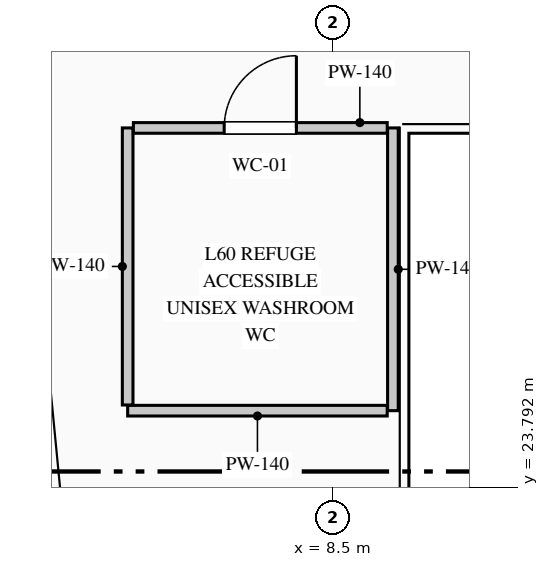
"""IFC4 building model, lengths in metres.
Left out: names, types, materials, properties, quantities, classifications, styles, units other than length and angle.
Written with IfcOpenShell. Run it as: python <this file> out.ifc"""

import sys

from ifc_helpers import new_model, si_unit, direction, frame, frame_2d, origin, place, context, subcontext, project, spatial, rectangle, extrude, element, fill, save


model = new_model("IFC4")
c1 = context("Model", 3, precision=1e-05, world=origin(), true_north=direction((0.0, 1.0)))
c2 = subcontext(c1, "Body", "Model", "MODEL_VIEW")
j1 = project(units=[si_unit("LENGTHUNIT", "METRE"), si_unit("PLANEANGLEUNIT", "RADIAN")], contexts=[c1])
p1 = place(None, origin())
s1 = spatial("IfcSite", under=j1, at=p1, CompositionType="ELEMENT")
p2 = place(p1, origin())
s2 = spatial("IfcBuilding", under=s1, at=p2, CompositionType="ELEMENT")
p3 = place(p2, frame((0.0, 0.0, 250.9)))
s3 = spatial("IfcBuildingStorey", under=s2, at=p3, CompositionType="ELEMENT", Elevation=250.9)
p4 = place(p3, frame((9.29, 28.52, 0.0), z_axis=(0.0, 0.0, 1.0), x_axis=(0.0, -1.0, 0.0)))
e1 = element("IfcWall", 1, at=p4, inside=s3, PredefinedType="PARTITIONING", context=c2, shape_type="SweptSolid", body=[
    extrude(rectangle(XDim=3.72, YDim=0.14, at=frame_2d((1.86, 0.0))), origin(), (0.0, 0.0, 1.0), 5.175),
])
p5 = place(p3, frame((9.215, 24.8, 0.0), z_axis=(0.0, 0.0, 1.0), x_axis=(-1.0, 0.0, 0.0)))
e2 = element("IfcWall", 2, at=p5, inside=s3, PredefinedType="PARTITIONING", context=c2, shape_type="SweptSolid", body=[
    extrude(rectangle(XDim=3.415, YDim=0.14, at=frame_2d((1.708, 0.0))), origin(), (0.0, 0.0, 1.0), 5.55),
])
p6 = place(p3, frame((5.8, 24.875, 0.0), z_axis=(0.0, 0.0, 1.0), x_axis=(0.0, 1.0, 0.0)))
e3 = element("IfcWall", 3, at=p6, inside=s3, PredefinedType="PARTITIONING", context=c2, shape_type="SweptSolid", body=[
    extrude(rectangle(XDim=3.645, YDim=0.14, at=frame_2d((1.823, 0.0))), origin(), (0.0, 0.0, 1.0), 5.55),
])
p7 = place(p3, frame((5.875, 28.52, 0.0), z_axis=(0.0, 0.0, 1.0), x_axis=(1.0, 0.0, 0.0)))
e4 = element("IfcWall", 4, at=p7, inside=s3, PredefinedType="PARTITIONING", context=c2, shape_type="SweptSolid", body=[
    extrude(rectangle(XDim=3.34, YDim=0.14, at=frame_2d((1.67, 0.0))), origin(), (0.0, 0.0, 1.0), 5.55),
])
p8 = place(p7, frame((1.195, 0.0, 0.0)))
e5 = element("IfcOpeningElement", 5, at=p8, cuts=e4, PredefinedType="OPENING", context=c2, shape_type="SweptSolid", body=[
    extrude(rectangle(XDim=0.95, YDim=2.15, at=frame_2d((0.475, 1.075))), frame((0.0, 0.08, 0.0), z_axis=(0.0, -1.0, 0.0), x_axis=(1.0, 0.0, 0.0)), (0.0, 0.0, 1.0), 0.16),
])
p9 = place(p8, origin())
e6 = element("IfcDoor", 6, at=p9, inside=s3, OperationType="SINGLE_SWING_RIGHT", PredefinedType="DOOR", context=c2, shape_type="SweptSolid", body=[
    extrude(rectangle(XDim=0.95, YDim=2.15, at=frame_2d((0.475, 1.075))), frame((0.0, 0.025, 0.0), z_axis=(0.0, -1.0, 0.0), x_axis=(1.0, 0.0, 0.0)), (0.0, 0.0, 1.0), 0.05),
])
fill(e5, e6)
save(model, sys.argv[1])
